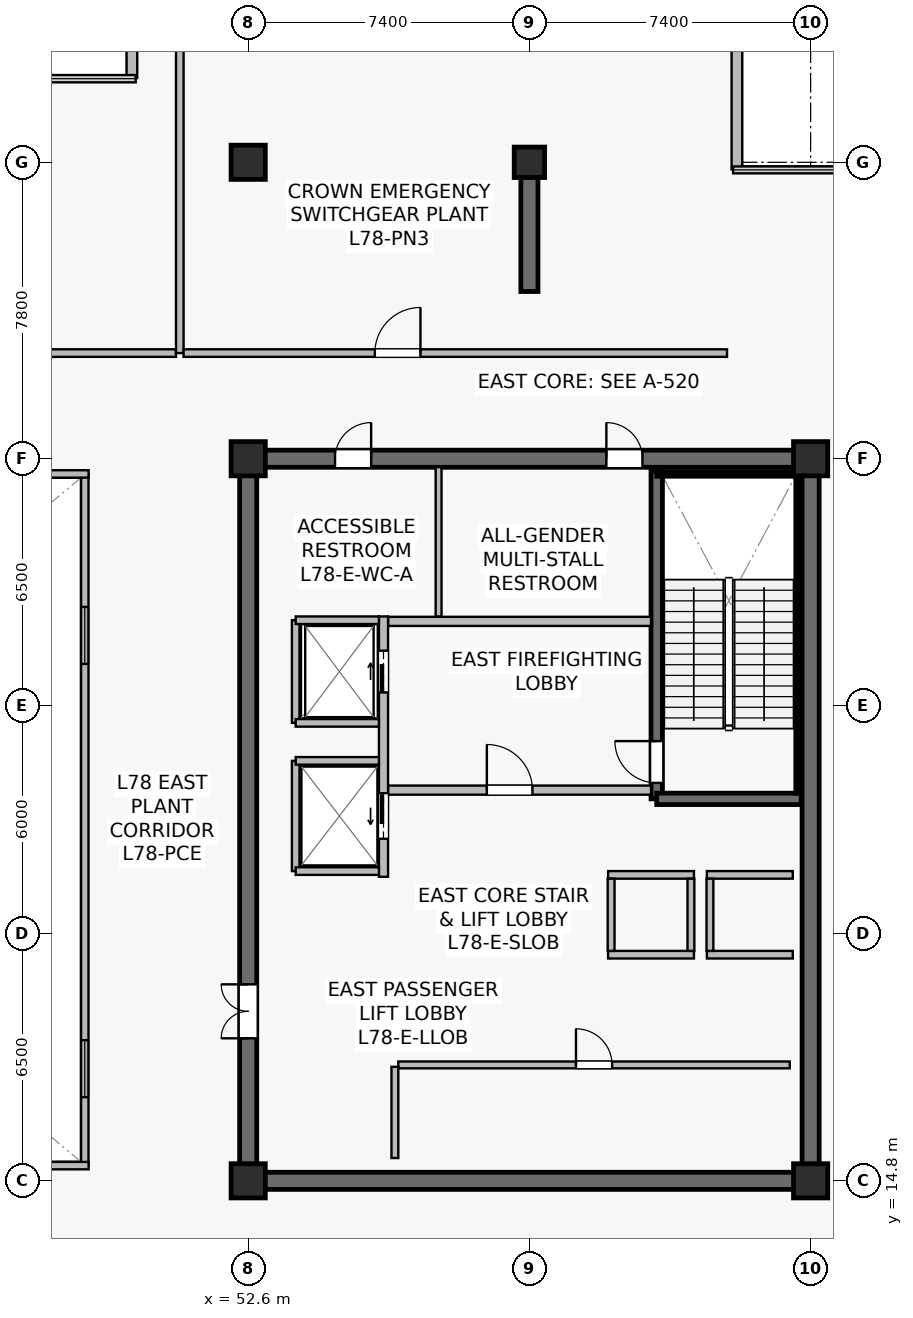
"""IFC4 building model, lengths in metres.
Left out: names, types, materials, properties, quantities, classifications, styles, units other than length and angle.
Written with IfcOpenShell. Run it as: python <this file> out.ifc"""

import sys

from ifc_helpers import new_model, si_unit, direction, frame, frame_2d, origin, origin_2d, place, context, subcontext, project, spatial, rectangle, extrude, source, transform, mapped, element, fill, save


model = new_model("IFC4")
c1 = context("Model", 3, precision=1e-05, world=origin(), true_north=direction((0.0, 1.0)))
c2 = subcontext(c1, "Body", "Model", "MODEL_VIEW")
j1 = project(units=[si_unit("LENGTHUNIT", "METRE"), si_unit("PLANEANGLEUNIT", "RADIAN")], contexts=[c1])
p1 = place(None, origin())
s1 = spatial("IfcSite", under=j1, at=p1, CompositionType="ELEMENT")
p2 = place(p1, origin())
s2 = spatial("IfcBuilding", under=s1, at=p2, CompositionType="ELEMENT")
p3 = place(p2, frame((0.0, 0.0, 327.0)))
s3 = spatial("IfcBuildingStorey", under=s2, at=p3, CompositionType="ELEMENT", Elevation=327.0)
p4 = place(p3, frame((52.375, 14.8, 0.0), z_axis=(0.0, 0.0, 1.0), x_axis=(1.0, 0.0, 0.0)))
e1 = element("IfcWall", 1, at=p4, inside=s3, PredefinedType="SHEAR", context=c2, shape_type="SweptSolid", body=[
    extrude(rectangle(XDim=15.25, YDim=0.45, at=frame_2d((7.625, 0.0))), origin(), (0.0, 0.0, 1.0), 5.12),
])
p5 = place(p3, frame((52.375, 33.8, 0.0), z_axis=(0.0, 0.0, 1.0), x_axis=(1.0, 0.0, 0.0)))
e2 = element("IfcWall", 2, at=p5, inside=s3, PredefinedType="SHEAR", context=c2, shape_type="SweptSolid", body=[
    extrude(rectangle(XDim=15.25, YDim=0.45, at=frame_2d((7.625, 0.0))), origin(), (0.0, 0.0, 1.0), 5.12),
])
p6 = place(p5, frame((9.65, 0.0, 0.0)))
e3 = element("IfcOpeningElement", 3, at=p6, cuts=e2, PredefinedType="OPENING", context=c2, shape_type="SweptSolid", body=[
    extrude(rectangle(XDim=0.95, YDim=2.15, at=frame_2d((0.475, 1.075))), frame((0.0, 0.235, 0.0), z_axis=(0.0, -1.0, 0.0), x_axis=(1.0, 0.0, 0.0)), (0.0, 0.0, 1.0), 0.47),
])
p7 = place(p5, frame((2.51, 0.0, 0.0)))
e4 = element("IfcOpeningElement", 4, at=p7, cuts=e2, PredefinedType="OPENING", context=c2, shape_type="SweptSolid", body=[
    extrude(rectangle(XDim=0.95, YDim=2.15, at=frame_2d((0.475, 1.075))), frame((0.0, 0.235, 0.0), z_axis=(0.0, -1.0, 0.0), x_axis=(1.0, 0.0, 0.0)), (0.0, 0.0, 1.0), 0.47),
])
p8 = place(p3, frame((52.6, 15.025, 0.0), z_axis=(0.0, 0.0, 1.0), x_axis=(0.0, 1.0, 0.0)))
e5 = element("IfcWall", 5, at=p8, inside=s3, PredefinedType="SHEAR", context=c2, shape_type="SweptSolid", body=[
    extrude(rectangle(XDim=18.55, YDim=0.45, at=frame_2d((9.275, 0.0))), origin(), (0.0, 0.0, 1.0), 5.12),
])
p9 = place(p8, frame((3.525, 0.0, 0.0)))
e6 = element("IfcOpeningElement", 6, at=p9, cuts=e5, PredefinedType="OPENING", context=c2, shape_type="SweptSolid", body=[
    extrude(rectangle(XDim=1.42, YDim=2.2, at=frame_2d((0.71, 1.1))), frame((0.0, 0.235, 0.0), z_axis=(0.0, -1.0, 0.0), x_axis=(1.0, 0.0, 0.0)), (0.0, 0.0, 1.0), 0.47),
])
p10 = place(p3, frame((67.4, 15.025, 0.0), z_axis=(0.0, 0.0, 1.0), x_axis=(0.0, 1.0, 0.0)))
e7 = element("IfcWall", 7, at=p10, inside=s3, PredefinedType="SHEAR", context=c2, shape_type="SweptSolid", body=[
    extrude(rectangle(XDim=18.55, YDim=0.45, at=frame_2d((9.275, 0.0))), origin(), (0.0, 0.0, 1.0), 5.12),
])
p11 = place(p3, frame((63.35, 24.85, 0.0), z_axis=(0.0, 0.0, 1.0), x_axis=(0.0, 1.0, 0.0)))
e8 = element("IfcWall", 8, at=p11, inside=s3, PredefinedType="SHEAR", context=c2, shape_type="SweptSolid", body=[
    extrude(rectangle(XDim=8.63, YDim=0.3, at=frame_2d((4.315, 0.0))), origin(), (0.0, 0.0, 1.0), 5.12),
])
p12 = place(p11, frame((0.42, 0.0, 0.0)))
e9 = element("IfcOpeningElement", 9, at=p12, cuts=e8, PredefinedType="OPENING", context=c2, shape_type="SweptSolid", body=[
    extrude(rectangle(XDim=1.1, YDim=2.15, at=frame_2d((0.55, 1.075))), frame((0.0, 0.16, 0.0), z_axis=(0.0, -1.0, 0.0), x_axis=(1.0, 0.0, 0.0)), (0.0, 0.0, 1.0), 0.32),
])
p13 = place(p3, frame((63.35, 24.85, 0.0), z_axis=(0.0, 0.0, 1.0), x_axis=(1.0, 0.0, 0.0)))
e10 = element("IfcWall", 10, at=p13, inside=s3, PredefinedType="SHEAR", context=c2, shape_type="SweptSolid", body=[
    extrude(rectangle(XDim=3.8, YDim=0.3, at=frame_2d((1.9, 0.0))), origin(), (0.0, 0.0, 1.0), 5.12),
])
p14 = place(p3, frame((63.35, 33.4, 0.0), z_axis=(0.0, 0.0, 1.0), x_axis=(1.0, 0.0, 0.0)))
e11 = element("IfcWall", 11, at=p14, inside=s3, PredefinedType="SOLIDWALL", context=c2, shape_type="SweptSolid", body=[
    extrude(rectangle(XDim=3.72, YDim=0.12, at=frame_2d((1.86, 0.0))), origin(), (0.0, 0.0, 1.0), 5.12),
])
p15 = place(p3, frame((67.07, 25.0, 0.0), z_axis=(0.0, 0.0, 1.0), x_axis=(0.0, 1.0, 0.0)))
e12 = element("IfcWall", 12, at=p15, inside=s3, PredefinedType="SOLIDWALL", context=c2, shape_type="SweptSolid", body=[
    extrude(rectangle(XDim=8.32, YDim=0.12, at=frame_2d((4.16, 0.0))), origin(), (0.0, 0.0, 1.0), 5.12),
])
p16 = place(p3, frame((60.0, 38.2, 0.0), z_axis=(0.0, 0.0, 1.0), x_axis=(0.0, 1.0, 0.0)))
e13 = element("IfcWall", 13, at=p16, inside=s3, PredefinedType="SHEAR", context=c2, shape_type="SweptSolid", body=[
    extrude(rectangle(XDim=3.1, YDim=0.45, at=frame_2d((1.55, 0.0))), origin(), (0.0, 0.0, 1.0), 5.12),
])
m1 = source(origin(), c2, "Body", "SweptSolid", [
    extrude(rectangle(XDim=0.9, YDim=0.9, at=origin_2d()), origin(), (0.0, 0.0, 1.0), 5.4),
])
for number, where, z_axis, x_axis in (
    (14, (52.6, 14.8, 0.0), (0.0, 0.0, 1.0), (1.0, 0.0, 0.0)),
    (15, (67.4, 14.8, 0.0), (0.0, 0.0, 1.0), (1.0, 0.0, 0.0)),
    (16, (52.6, 33.8, 0.0), (0.0, 0.0, 1.0), (1.0, 0.0, 0.0)),
    (17, (67.4, 33.8, 0.0), (0.0, 0.0, 1.0), (1.0, 0.0, 0.0)),
    (18, (52.6, 41.6, 0.0), (0.0, 0.0, 1.0), (1.0, 0.0, 0.0)),
):
    element("IfcColumn", number, at=place(p3, frame(where, z_axis=z_axis, x_axis=x_axis)), inside=s3, PredefinedType="COLUMN", context=c2, shape_type="MappedRepresentation", body=[
        mapped(m1, transform((0.0, 0.0, 0.0), scale=1.0)),
    ])
m2 = source(origin(), c2, "Body", "SweptSolid", [
    extrude(rectangle(XDim=0.8, YDim=0.8, at=origin_2d()), origin(), (0.0, 0.0, 1.0), 5.4),
])
p17 = place(p3, frame((60.0, 41.6, 0.0), z_axis=(0.0, 0.0, 1.0), x_axis=(1.0, 0.0, 0.0)))
e19 = element("IfcColumn", 19, at=p17, inside=s3, PredefinedType="COLUMN", context=c2, shape_type="MappedRepresentation", body=[
    mapped(m2, transform((0.0, 0.0, 0.0), scale=1.0)),
])
p18 = place(p3, frame((65.46, 41.412, 0.0), z_axis=(0.0, 0.0, 1.0), x_axis=(0.0, 1.0, 0.0)))
e20 = element("IfcWall", 20, at=p18, inside=s3, PredefinedType="STANDARD", context=c2, shape_type="SweptSolid", body=[
    extrude(rectangle(XDim=3.488, YDim=0.28, at=frame_2d((1.744, 0.0))), origin(), (0.0, 0.0, 1.0), 5.12),
])
p19 = place(p3, frame((49.54, 44.9, 0.0), z_axis=(0.0, 0.0, 1.0), x_axis=(0.0, -1.0, 0.0)))
e21 = element("IfcWall", 21, at=p19, inside=s3, PredefinedType="STANDARD", context=c2, shape_type="SweptSolid", body=[
    extrude(rectangle(XDim=1.083, YDim=0.28, at=frame_2d((0.542, 0.0))), origin(), (0.0, 0.0, 1.0), 5.12),
])
p20 = place(p3, frame((56.28, 25.08, 0.0), z_axis=(0.0, 0.0, 1.0), x_axis=(1.0, 0.0, 0.0)))
e22 = element("IfcWall", 22, at=p20, inside=s3, PredefinedType="SOLIDWALL", context=c2, shape_type="SweptSolid", body=[
    extrude(rectangle(XDim=6.92, YDim=0.24, at=frame_2d((3.46, 0.0))), origin(), (0.0, 0.0, 1.0), 4.517),
])
p21 = place(p20, frame((2.6, 0.0, 0.0)))
e23 = element("IfcOpeningElement", 23, at=p21, cuts=e22, PredefinedType="OPENING", context=c2, shape_type="SweptSolid", body=[
    extrude(rectangle(XDim=1.2, YDim=2.16, at=frame_2d((0.6, 1.08))), frame((0.0, 0.13, 0.0), z_axis=(0.0, -1.0, 0.0), x_axis=(1.0, 0.0, 0.0)), (0.0, 0.0, 1.0), 0.26),
])
p22 = place(p3, frame((56.28, 29.52, 0.0), z_axis=(0.0, 0.0, 1.0), x_axis=(1.0, 0.0, 0.0)))
e24 = element("IfcWall", 24, at=p22, inside=s3, PredefinedType="SOLIDWALL", context=c2, shape_type="SweptSolid", body=[
    extrude(rectangle(XDim=6.92, YDim=0.24, at=frame_2d((3.46, 0.0))), origin(), (0.0, 0.0, 1.0), 4.517),
])
p23 = place(p3, frame((56.16, 22.8, 0.0), z_axis=(0.0, 0.0, 1.0), x_axis=(0.0, 1.0, 0.0)))
e25 = element("IfcWall", 25, at=p23, inside=s3, PredefinedType="SOLIDWALL", context=c2, shape_type="SweptSolid", body=[
    extrude(rectangle(XDim=6.85, YDim=0.24, at=frame_2d((3.425, 0.0))), origin(), (0.0, 0.0, 1.0), 4.255),
])
p24 = place(p23, frame((4.85, 0.0, 0.0)))
e26 = element("IfcOpeningElement", 26, at=p24, cuts=e25, PredefinedType="OPENING", context=c2, shape_type="SweptSolid", body=[
    extrude(rectangle(XDim=1.1, YDim=2.22, at=frame_2d((0.55, 1.11))), frame((0.0, 0.13, 0.0), z_axis=(0.0, -1.0, 0.0), x_axis=(1.0, 0.0, 0.0)), (0.0, 0.0, 1.0), 0.26),
])
p25 = place(p23, frame((1.0, 0.0, 0.0)))
e27 = element("IfcOpeningElement", 27, at=p25, cuts=e25, PredefinedType="OPENING", context=c2, shape_type="SweptSolid", body=[
    extrude(rectangle(XDim=1.2, YDim=2.22, at=frame_2d((0.6, 1.11))), frame((0.0, 0.13, 0.0), z_axis=(0.0, -1.0, 0.0), x_axis=(1.0, 0.0, 0.0)), (0.0, 0.0, 1.0), 0.26),
])
for number, where, z_axis, x_axis in (
    (28, (64.67, 20.75, 0.0), (0.0, 0.0, 1.0), (1.0, 0.0, 0.0)),
    (29, (64.67, 22.85, 0.0), (0.0, 0.0, 1.0), (1.0, 0.0, 0.0)),
):
    element("IfcWall", number, at=place(p3, frame(where, z_axis=z_axis, x_axis=x_axis)), inside=s3, PredefinedType="SOLIDWALL", context=c2, shape_type="SweptSolid", body=[
        extrude(rectangle(XDim=2.26, YDim=0.2, at=frame_2d((1.13, 0.0))), origin(), (0.0, 0.0, 1.0), 5.12),
    ])
p26 = place(p3, frame((64.75, 20.85, 0.0), z_axis=(0.0, 0.0, 1.0), x_axis=(0.0, 1.0, 0.0)))
e30 = element("IfcWall", 30, at=p26, inside=s3, PredefinedType="SOLIDWALL", context=c2, shape_type="SweptSolid", body=[
    extrude(rectangle(XDim=1.9, YDim=0.18, at=frame_2d((0.95, 0.0))), origin(), (0.0, 0.0, 1.0), 5.12),
])
for number, where, z_axis, x_axis in (
    (31, (62.07, 20.75, 0.0), (0.0, 0.0, 1.0), (1.0, 0.0, 0.0)),
    (32, (62.07, 22.85, 0.0), (0.0, 0.0, 1.0), (1.0, 0.0, 0.0)),
):
    element("IfcWall", number, at=place(p3, frame(where, z_axis=z_axis, x_axis=x_axis)), inside=s3, PredefinedType="SOLIDWALL", context=c2, shape_type="SweptSolid", body=[
        extrude(rectangle(XDim=2.26, YDim=0.2, at=frame_2d((1.13, 0.0))), origin(), (0.0, 0.0, 1.0), 5.12),
    ])
for number, where, z_axis, x_axis in (
    (33, (62.15, 20.85, 0.0), (0.0, 0.0, 1.0), (0.0, 1.0, 0.0)),
    (34, (64.25, 20.85, 0.0), (0.0, 0.0, 1.0), (0.0, 1.0, 0.0)),
):
    element("IfcWall", number, at=place(p3, frame(where, z_axis=z_axis, x_axis=x_axis)), inside=s3, PredefinedType="SOLIDWALL", context=c2, shape_type="SweptSolid", body=[
        extrude(rectangle(XDim=1.9, YDim=0.18, at=frame_2d((0.95, 0.0))), origin(), (0.0, 0.0, 1.0), 5.12),
    ])
p27 = place(p3, frame((53.85, 26.85, 0.0), z_axis=(0.0, 0.0, 1.0), x_axis=(0.0, 1.0, 0.0)))
e35 = element("IfcWall", 35, at=p27, inside=s3, PredefinedType="SOLIDWALL", context=c2, shape_type="SweptSolid", body=[
    extrude(rectangle(XDim=2.7, YDim=0.2, at=frame_2d((1.35, 0.0))), origin(), (0.0, 0.0, 1.0), 5.12),
])
p28 = place(p3, frame((53.85, 29.55, 0.0), z_axis=(0.0, 0.0, 1.0), x_axis=(1.0, 0.0, 0.0)))
e36 = element("IfcWall", 36, at=p28, inside=s3, PredefinedType="SOLIDWALL", context=c2, shape_type="SweptSolid", body=[
    extrude(rectangle(XDim=2.19, YDim=0.2, at=frame_2d((1.095, 0.0))), origin(), (0.0, 0.0, 1.0), 5.12),
])
p29 = place(p3, frame((53.85, 26.85, 0.0), z_axis=(0.0, 0.0, 1.0), x_axis=(1.0, 0.0, 0.0)))
e37 = element("IfcWall", 37, at=p29, inside=s3, PredefinedType="SOLIDWALL", context=c2, shape_type="SweptSolid", body=[
    extrude(rectangle(XDim=2.19, YDim=0.2, at=frame_2d((1.095, 0.0))), origin(), (0.0, 0.0, 1.0), 4.517),
])
p30 = place(p3, frame((53.85, 22.95, 0.0), z_axis=(0.0, 0.0, 1.0), x_axis=(0.0, 1.0, 0.0)))
e38 = element("IfcWall", 38, at=p30, inside=s3, PredefinedType="SOLIDWALL", context=c2, shape_type="SweptSolid", body=[
    extrude(rectangle(XDim=2.9, YDim=0.2, at=frame_2d((1.45, 0.0))), origin(), (0.0, 0.0, 1.0), 4.255),
])
for number, where, z_axis, x_axis in (
    (39, (53.85, 25.85, 0.0), (0.0, 0.0, 1.0), (1.0, 0.0, 0.0)),
    (40, (53.85, 22.95, 0.0), (0.0, 0.0, 1.0), (1.0, 0.0, 0.0)),
):
    element("IfcWall", number, at=place(p3, frame(where, z_axis=z_axis, x_axis=x_axis)), inside=s3, PredefinedType="SOLIDWALL", context=c2, shape_type="SweptSolid", body=[
        extrude(rectangle(XDim=2.19, YDim=0.2, at=frame_2d((1.095, 0.0))), origin(), (0.0, 0.0, 1.0), 5.12),
    ])
p31 = place(p3, frame((56.55, 17.85, 0.0), z_axis=(0.0, 0.0, 1.0), x_axis=(1.0, 0.0, 0.0)))
e41 = element("IfcWall", 41, at=p31, inside=s3, PredefinedType="SOLIDWALL", context=c2, shape_type="SweptSolid", body=[
    extrude(rectangle(XDim=10.3, YDim=0.18, at=frame_2d((5.15, 0.0))), origin(), (0.0, 0.0, 1.0), 4.517),
])
p32 = place(p31, frame((4.675, 0.0, 0.0)))
e42 = element("IfcOpeningElement", 42, at=p32, cuts=e41, PredefinedType="OPENING", context=c2, shape_type="SweptSolid", body=[
    extrude(rectangle(XDim=0.95, YDim=2.15, at=frame_2d((0.475, 1.075))), frame((0.0, 0.1, 0.0), z_axis=(0.0, -1.0, 0.0), x_axis=(1.0, 0.0, 0.0)), (0.0, 0.0, 1.0), 0.2),
])
p33 = place(p3, frame((56.46, 15.4, 0.0), z_axis=(0.0, 0.0, 1.0), x_axis=(0.0, 1.0, 0.0)))
e43 = element("IfcWall", 43, at=p33, inside=s3, PredefinedType="SOLIDWALL", context=c2, shape_type="SweptSolid", body=[
    extrude(rectangle(XDim=2.4, YDim=0.18, at=frame_2d((1.2, 0.0))), origin(), (0.0, 0.0, 1.0), 5.12),
])
p34 = place(p3, frame((57.61, 29.65, 0.0), z_axis=(0.0, 0.0, 1.0), x_axis=(0.0, 1.0, 0.0)))
e44 = element("IfcWall", 44, at=p34, inside=s3, PredefinedType="PLUMBINGWALL", context=c2, shape_type="SweptSolid", body=[
    extrude(rectangle(XDim=3.93, YDim=0.155, at=frame_2d((1.965, 0.0))), origin(), (0.0, 0.0, 1.0), 5.12),
])
p35 = place(p3, frame((48.3, 15.2, 0.0), z_axis=(0.0, 0.0, 1.0), x_axis=(0.0, 1.0, 0.0)))
e45 = element("IfcWall", 45, at=p35, inside=s3, PredefinedType="SOLIDWALL", context=c2, shape_type="SweptSolid", body=[
    extrude(rectangle(XDim=18.2, YDim=0.195, at=frame_2d((9.1, 0.0))), origin(), (0.0, 0.0, 1.0), 5.12),
])
p36 = place(p35, frame((1.8, 0.0, 0.9)))
e46 = element("IfcOpeningElement", 46, at=p36, cuts=e45, PredefinedType="OPENING", context=c2, shape_type="SweptSolid", body=[
    extrude(rectangle(XDim=1.5, YDim=1.4, at=frame_2d((0.75, 0.7))), frame((0.0, 0.107, 0.0), z_axis=(0.0, -1.0, 0.0), x_axis=(1.0, 0.0, 0.0)), (0.0, 0.0, 1.0), 0.215),
])
p37 = place(p35, frame((13.2, 0.0, 0.9)))
e47 = element("IfcOpeningElement", 47, at=p37, cuts=e45, PredefinedType="OPENING", context=c2, shape_type="SweptSolid", body=[
    extrude(rectangle(XDim=1.5, YDim=1.4, at=frame_2d((0.75, 0.7))), frame((0.0, 0.107, 0.0), z_axis=(0.0, -1.0, 0.0), x_axis=(1.0, 0.0, 0.0)), (0.0, 0.0, 1.0), 0.215),
])
for number, where, z_axis, x_axis in (
    (48, (26.4, 15.2, 0.0), (0.0, 0.0, 1.0), (1.0, 0.0, 0.0)),
    (49, (26.4, 33.4, 0.0), (0.0, 0.0, 1.0), (1.0, 0.0, 0.0)),
):
    element("IfcWall", number, at=place(p3, frame(where, z_axis=z_axis, x_axis=x_axis)), inside=s3, PredefinedType="SOLIDWALL", context=c2, shape_type="SweptSolid", body=[
        extrude(rectangle(XDim=22.0, YDim=0.195, at=frame_2d((11.0, 0.0))), origin(), (0.0, 0.0, 1.0), 5.12),
    ])
p38 = place(p3, frame((24.1, 36.58, 0.0), z_axis=(0.0, 0.0, 1.0), x_axis=(1.0, 0.0, 0.0)))
e50 = element("IfcWall", 50, at=p38, inside=s3, PredefinedType="SOLIDWALL", context=c2, shape_type="SweptSolid", body=[
    extrude(rectangle(XDim=26.6, YDim=0.2, at=frame_2d((13.3, 0.0))), origin(), (0.0, 0.0, 1.0), 4.517),
])
p39 = place(p38, frame((12.7, 0.0, 0.0)))
e51 = element("IfcOpeningElement", 51, at=p39, cuts=e50, PredefinedType="OPENING", context=c2, shape_type="SweptSolid", body=[
    extrude(rectangle(XDim=1.2, YDim=2.16, at=frame_2d((0.6, 1.08))), frame((0.0, 0.11, 0.0), z_axis=(0.0, -1.0, 0.0), x_axis=(1.0, 0.0, 0.0)), (0.0, 0.0, 1.0), 0.22),
])
p40 = place(p3, frame((50.8, 36.58, 0.0), z_axis=(0.0, 0.0, 1.0), x_axis=(0.0, 1.0, 0.0)))
e52 = element("IfcWall", 52, at=p40, inside=s3, PredefinedType="SOLIDWALL", context=c2, shape_type="SweptSolid", body=[
    extrude(rectangle(XDim=8.21, YDim=0.2, at=frame_2d((4.105, 0.0))), origin(), (0.0, 0.0, 1.0), 4.455),
])
p41 = place(p3, frame((50.9, 36.58, 0.0), z_axis=(0.0, 0.0, 1.0), x_axis=(1.0, 0.0, 0.0)))
e53 = element("IfcWall", 53, at=p41, inside=s3, PredefinedType="SOLIDWALL", context=c2, shape_type="SweptSolid", body=[
    extrude(rectangle(XDim=14.3, YDim=0.2, at=frame_2d((7.15, 0.0))), origin(), (0.0, 0.0, 1.0), 4.517),
])
p42 = place(p41, frame((5.032, 0.0, 0.0)))
e54 = element("IfcOpeningElement", 54, at=p42, cuts=e53, PredefinedType="OPENING", context=c2, shape_type="SweptSolid", body=[
    extrude(rectangle(XDim=1.2, YDim=2.16, at=frame_2d((0.6, 1.08))), frame((0.0, 0.11, 0.0), z_axis=(0.0, -1.0, 0.0), x_axis=(1.0, 0.0, 0.0)), (0.0, 0.0, 1.0), 0.22),
])
m3 = source(origin(), c2, "Body", "SweptSolid", [
    extrude(rectangle(XDim=1.5, YDim=1.4, at=frame_2d((0.75, 0.7))), frame((0.0, 0.03, 0.0), z_axis=(0.0, -1.0, 0.0), x_axis=(1.0, 0.0, 0.0)), (0.0, 0.0, 1.0), 0.06),
])
p43 = place(p36, origin())
e55 = element("IfcWindow", 55, at=p43, inside=s3, PartitioningType="SINGLE_PANEL", PredefinedType="WINDOW", context=c2, shape_type="MappedRepresentation", body=[
    mapped(m3, transform((0.0, 0.0, 0.0), scale=1.0)),
])
fill(e46, e55)
p44 = place(p37, origin())
e56 = element("IfcWindow", 56, at=p44, inside=s3, PartitioningType="SINGLE_PANEL", PredefinedType="WINDOW", context=c2, shape_type="MappedRepresentation", body=[
    mapped(m3, transform((0.0, 0.0, 0.0), scale=1.0)),
])
fill(e47, e56)
m4 = source(origin(), c2, "Body", "SweptSolid", [
    extrude(rectangle(XDim=1.1, YDim=2.15, at=frame_2d((0.55, 1.075))), frame((0.0, 0.025, 0.0), z_axis=(0.0, -1.0, 0.0), x_axis=(1.0, 0.0, 0.0)), (0.0, 0.0, 1.0), 0.05),
])
p45 = place(p12, origin())
e57 = element("IfcDoor", 57, at=p45, inside=s3, OperationType="SINGLE_SWING_RIGHT", PredefinedType="DOOR", context=c2, shape_type="MappedRepresentation", body=[
    mapped(m4, transform((0.0, 0.0, 0.0), scale=1.0)),
])
fill(e9, e57)
m5 = source(origin(), c2, "Body", "SweptSolid", [
    extrude(rectangle(XDim=1.2, YDim=2.16, at=frame_2d((0.6, 1.08))), frame((0.0, 0.025, 0.0), z_axis=(0.0, -1.0, 0.0), x_axis=(1.0, 0.0, 0.0)), (0.0, 0.0, 1.0), 0.05),
])
p46 = place(p21, origin())
e58 = element("IfcDoor", 58, at=p46, inside=s3, OperationType="SINGLE_SWING_LEFT", PredefinedType="DOOR", context=c2, shape_type="MappedRepresentation", body=[
    mapped(m5, transform((0.0, 0.0, 0.0), scale=1.0)),
])
fill(e23, e58)
m6 = source(origin(), c2, "Body", "SweptSolid", [
    extrude(rectangle(XDim=1.1, YDim=2.22, at=frame_2d((0.55, 1.11))), frame((0.0, 0.025, 0.0), z_axis=(0.0, -1.0, 0.0), x_axis=(1.0, 0.0, 0.0)), (0.0, 0.0, 1.0), 0.05),
])
p47 = place(p24, origin())
e59 = element("IfcDoor", 59, at=p47, inside=s3, OperationType="SLIDING_TO_RIGHT", PredefinedType="USERDEFINED", context=c2, shape_type="MappedRepresentation", body=[
    mapped(m6, transform((0.0, 0.0, 0.0), scale=1.0)),
])
fill(e26, e59)
m7 = source(origin(), c2, "Body", "SweptSolid", [
    extrude(rectangle(XDim=1.2, YDim=2.22, at=frame_2d((0.6, 1.11))), frame((0.0, 0.025, 0.0), z_axis=(0.0, -1.0, 0.0), x_axis=(1.0, 0.0, 0.0)), (0.0, 0.0, 1.0), 0.05),
])
p48 = place(p25, origin())
e60 = element("IfcDoor", 60, at=p48, inside=s3, OperationType="SLIDING_TO_LEFT", PredefinedType="USERDEFINED", context=c2, shape_type="MappedRepresentation", body=[
    mapped(m7, transform((0.0, 0.0, 0.0), scale=1.0)),
])
fill(e27, e60)
m8 = source(origin(), c2, "Body", "SweptSolid", [
    extrude(rectangle(XDim=0.95, YDim=2.15, at=frame_2d((0.475, 1.075))), frame((0.0, 0.025, 0.0), z_axis=(0.0, -1.0, 0.0), x_axis=(1.0, 0.0, 0.0)), (0.0, 0.0, 1.0), 0.05),
])
p49 = place(p32, origin())
e61 = element("IfcDoor", 61, at=p49, inside=s3, OperationType="SINGLE_SWING_LEFT", PredefinedType="DOOR", context=c2, shape_type="MappedRepresentation", body=[
    mapped(m8, transform((0.0, 0.0, 0.0), scale=1.0)),
])
fill(e42, e61)
m9 = source(origin(), c2, "Body", "SweptSolid", [
    extrude(rectangle(XDim=1.42, YDim=2.2, at=frame_2d((0.71, 1.1))), frame((0.0, 0.025, 0.0), z_axis=(0.0, -1.0, 0.0), x_axis=(1.0, 0.0, 0.0)), (0.0, 0.0, 1.0), 0.05),
])
p50 = place(p9, origin())
e62 = element("IfcDoor", 62, at=p50, inside=s3, OperationType="DOUBLE_DOOR_SINGLE_SWING", PredefinedType="DOOR", context=c2, shape_type="MappedRepresentation", body=[
    mapped(m9, transform((0.0, 0.0, 0.0), scale=1.0)),
])
fill(e6, e62)
p51 = place(p6, origin())
e63 = element("IfcDoor", 63, at=p51, inside=s3, OperationType="SINGLE_SWING_LEFT", PredefinedType="DOOR", context=c2, shape_type="MappedRepresentation", body=[
    mapped(m8, transform((0.0, 0.0, 0.0), scale=1.0)),
])
fill(e3, e63)
p52 = place(p7, origin())
e64 = element("IfcDoor", 64, at=p52, inside=s3, OperationType="SINGLE_SWING_RIGHT", PredefinedType="DOOR", context=c2, shape_type="MappedRepresentation", body=[
    mapped(m8, transform((0.0, 0.0, 0.0), scale=1.0)),
])
fill(e4, e64)
p53 = place(p42, origin())
e65 = element("IfcDoor", 65, at=p53, inside=s3, OperationType="SINGLE_SWING_RIGHT", PredefinedType="DOOR", context=c2, shape_type="MappedRepresentation", body=[
    mapped(m5, transform((0.0, 0.0, 0.0), scale=1.0)),
])
fill(e54, e65)
save(model, sys.argv[1])
